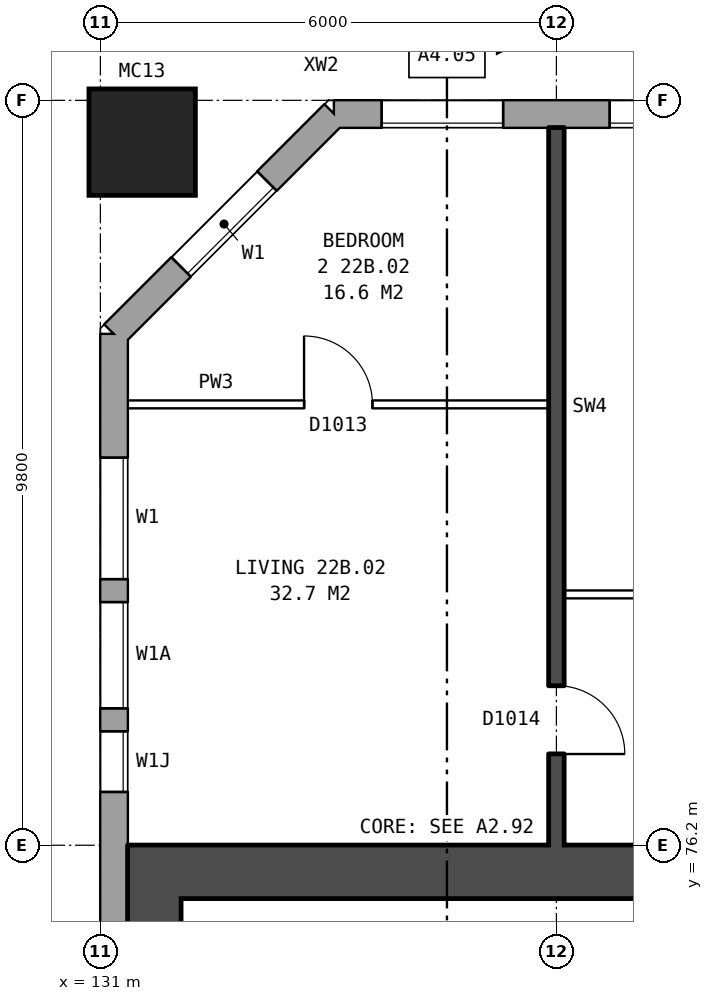
"""IFC4 building model, lengths in metres.
Left out: names, types, materials, properties, quantities, classifications, styles, units other than length and angle.
Written with IfcOpenShell. Run it as: python <this file> out.ifc"""

import sys

from ifc_helpers import new_model, si_unit, direction, frame, frame_2d, origin, origin_2d, place, context, subcontext, project, spatial, rectangle, hollow_rectangle, extrude, element, fill, save


model = new_model("IFC4")
c1 = context("Model", 3, precision=1e-05, world=origin(), true_north=direction((0.0, 1.0)))
c2 = subcontext(c1, "Body", "Model", "MODEL_VIEW")
j1 = project(units=[si_unit("LENGTHUNIT", "METRE"), si_unit("PLANEANGLEUNIT", "RADIAN")], contexts=[c1])
p1 = place(None, origin())
s1 = spatial("IfcSite", under=j1, at=p1, CompositionType="ELEMENT")
p2 = place(p1, origin())
s2 = spatial("IfcBuilding", under=s1, at=p2, CompositionType="ELEMENT")
p3 = place(p2, frame((0.0, 0.0, 80.9)))
s3 = spatial("IfcBuildingStorey", under=s2, at=p3, CompositionType="ELEMENT", Elevation=80.9)
p4 = place(p3, frame((131.55, 85.45, 0.0), z_axis=(0.0, 0.0, 1.0), x_axis=(1.0, 0.0, 0.0)))
e1 = element("IfcColumn", 1, at=p4, inside=s3, PredefinedType="COLUMN", context=c2, shape_type="SweptSolid", body=[
    extrude(hollow_rectangle(XDim=1.4, YDim=1.4, WallThickness=0.075, at=origin_2d()), origin(), (0.0, 0.0, 1.0), 3.1),
])
p5 = place(p3, frame((172.175, 85.82, 0.0), z_axis=(0.0, 0.0, 1.0), x_axis=(-1.0, 0.0, 0.0)))
e2 = element("IfcWall", 2, at=p5, inside=s3, PredefinedType="STANDARD", context=c2, shape_type="SweptSolid", body=[
    extrude(rectangle(XDim=38.101, YDim=0.36, at=frame_2d((19.05, 0.0))), origin(), (0.0, 0.0, 1.0), 2.85),
])
p6 = place(p5, frame((2.875, 0.0, 0.8)))
e3 = element("IfcOpeningElement", 3, at=p6, cuts=e2, PredefinedType="OPENING", context=c2, shape_type="SweptSolid", body=[
    extrude(rectangle(XDim=1.6, YDim=1.8, at=frame_2d((0.8, 0.9))), frame((0.0, 0.19, 0.0), z_axis=(0.0, -1.0, 0.0), x_axis=(1.0, 0.0, 0.0)), (0.0, 0.0, 1.0), 0.38),
])
p7 = place(p5, frame((5.875, 0.0, 0.8)))
e4 = element("IfcOpeningElement", 4, at=p7, cuts=e2, PredefinedType="OPENING", context=c2, shape_type="SweptSolid", body=[
    extrude(rectangle(XDim=1.6, YDim=1.8, at=frame_2d((0.8, 0.9))), frame((0.0, 0.19, 0.0), z_axis=(0.0, -1.0, 0.0), x_axis=(1.0, 0.0, 0.0)), (0.0, 0.0, 1.0), 0.38),
])
p8 = place(p5, frame((8.875, 0.0, 0.8)))
e5 = element("IfcOpeningElement", 5, at=p8, cuts=e2, PredefinedType="OPENING", context=c2, shape_type="SweptSolid", body=[
    extrude(rectangle(XDim=1.6, YDim=1.8, at=frame_2d((0.8, 0.9))), frame((0.0, 0.19, 0.0), z_axis=(0.0, -1.0, 0.0), x_axis=(1.0, 0.0, 0.0)), (0.0, 0.0, 1.0), 0.38),
])
p9 = place(p5, frame((12.575, 0.0, 0.8)))
e6 = element("IfcOpeningElement", 6, at=p9, cuts=e2, PredefinedType="OPENING", context=c2, shape_type="SweptSolid", body=[
    extrude(rectangle(XDim=0.6, YDim=0.9, at=frame_2d((0.3, 0.45))), frame((0.0, 0.19, 0.0), z_axis=(0.0, -1.0, 0.0), x_axis=(1.0, 0.0, 0.0)), (0.0, 0.0, 1.0), 0.38),
])
p10 = place(p5, frame((14.875, 0.0, 0.8)))
e7 = element("IfcOpeningElement", 7, at=p10, cuts=e2, PredefinedType="OPENING", context=c2, shape_type="SweptSolid", body=[
    extrude(rectangle(XDim=1.6, YDim=1.8, at=frame_2d((0.8, 0.9))), frame((0.0, 0.19, 0.0), z_axis=(0.0, -1.0, 0.0), x_axis=(1.0, 0.0, 0.0)), (0.0, 0.0, 1.0), 0.38),
])
p11 = place(p5, frame((17.875, 0.0, 0.8)))
e8 = element("IfcOpeningElement", 8, at=p11, cuts=e2, PredefinedType="OPENING", context=c2, shape_type="SweptSolid", body=[
    extrude(rectangle(XDim=1.6, YDim=1.8, at=frame_2d((0.8, 0.9))), frame((0.0, 0.19, 0.0), z_axis=(0.0, -1.0, 0.0), x_axis=(1.0, 0.0, 0.0)), (0.0, 0.0, 1.0), 0.38),
])
p12 = place(p5, frame((20.875, 0.0, 0.8)))
e9 = element("IfcOpeningElement", 9, at=p12, cuts=e2, PredefinedType="OPENING", context=c2, shape_type="SweptSolid", body=[
    extrude(rectangle(XDim=1.6, YDim=1.8, at=frame_2d((0.8, 0.9))), frame((0.0, 0.19, 0.0), z_axis=(0.0, -1.0, 0.0), x_axis=(1.0, 0.0, 0.0)), (0.0, 0.0, 1.0), 0.38),
])
p13 = place(p5, frame((23.375, 0.0, 0.65)))
e10 = element("IfcOpeningElement", 10, at=p13, cuts=e2, PredefinedType="OPENING", context=c2, shape_type="SweptSolid", body=[
    extrude(rectangle(XDim=1.4, YDim=1.8, at=frame_2d((0.7, 0.9))), frame((0.0, 0.19, 0.0), z_axis=(0.0, -1.0, 0.0), x_axis=(1.0, 0.0, 0.0)), (0.0, 0.0, 1.0), 0.38),
])
p14 = place(p5, frame((26.675, 0.0, 1.7)))
e11 = element("IfcOpeningElement", 11, at=p14, cuts=e2, PredefinedType="OPENING", context=c2, shape_type="SweptSolid", body=[
    extrude(rectangle(XDim=0.6, YDim=0.9, at=frame_2d((0.3, 0.45))), frame((0.0, 0.19, 0.0), z_axis=(0.0, -1.0, 0.0), x_axis=(1.0, 0.0, 0.0)), (0.0, 0.0, 1.0), 0.38),
])
p15 = place(p5, frame((29.875, 0.0, 0.8)))
e12 = element("IfcOpeningElement", 12, at=p15, cuts=e2, PredefinedType="OPENING", context=c2, shape_type="SweptSolid", body=[
    extrude(rectangle(XDim=1.6, YDim=1.8, at=frame_2d((0.8, 0.9))), frame((0.0, 0.19, 0.0), z_axis=(0.0, -1.0, 0.0), x_axis=(1.0, 0.0, 0.0)), (0.0, 0.0, 1.0), 0.38),
])
p16 = place(p5, frame((32.875, 0.0, 0.8)))
e13 = element("IfcOpeningElement", 13, at=p16, cuts=e2, PredefinedType="OPENING", context=c2, shape_type="SweptSolid", body=[
    extrude(rectangle(XDim=1.6, YDim=1.8, at=frame_2d((0.8, 0.9))), frame((0.0, 0.19, 0.0), z_axis=(0.0, -1.0, 0.0), x_axis=(1.0, 0.0, 0.0)), (0.0, 0.0, 1.0), 0.38),
])
p17 = place(p5, frame((35.875, 0.0, 0.8)))
e14 = element("IfcOpeningElement", 14, at=p17, cuts=e2, PredefinedType="OPENING", context=c2, shape_type="SweptSolid", body=[
    extrude(rectangle(XDim=1.6, YDim=1.8, at=frame_2d((0.8, 0.9))), frame((0.0, 0.19, 0.0), z_axis=(0.0, -1.0, 0.0), x_axis=(1.0, 0.0, 0.0)), (0.0, 0.0, 1.0), 0.38),
])
p18 = place(p5, frame((13.475, 0.0, 0.8)))
e15 = element("IfcOpeningElement", 15, at=p18, cuts=e2, PredefinedType="OPENING", context=c2, shape_type="SweptSolid", body=[
    extrude(rectangle(XDim=1.0, YDim=1.8, at=frame_2d((0.5, 0.9))), frame((0.0, 0.19, 0.0), z_axis=(0.0, -1.0, 0.0), x_axis=(1.0, 0.0, 0.0)), (0.0, 0.0, 1.0), 0.38),
])
p19 = place(p5, frame((25.075, 0.0, 0.55)))
e16 = element("IfcOpeningElement", 16, at=p19, cuts=e2, PredefinedType="OPENING", context=c2, shape_type="SweptSolid", body=[
    extrude(rectangle(XDim=0.6, YDim=0.9, at=frame_2d((0.3, 0.45))), frame((0.0, 0.19, 0.0), z_axis=(0.0, -1.0, 0.0), x_axis=(1.0, 0.0, 0.0)), (0.0, 0.0, 1.0), 0.38),
])
p20 = place(p5, frame((27.575, 0.0, 0.8)))
e17 = element("IfcOpeningElement", 17, at=p20, cuts=e2, PredefinedType="OPENING", context=c2, shape_type="SweptSolid", body=[
    extrude(rectangle(XDim=1.4, YDim=1.8, at=frame_2d((0.7, 0.9))), frame((0.0, 0.19, 0.0), z_axis=(0.0, -1.0, 0.0), x_axis=(1.0, 0.0, 0.0)), (0.0, 0.0, 1.0), 0.38),
])
p21 = place(p3, frame((134.075, 85.82, 0.0), z_axis=(0.0, 0.0, 1.0), x_axis=(-0.707106781187, -0.707106781187, 0.0)))
e18 = element("IfcWall", 18, at=p21, inside=s3, PredefinedType="STANDARD", context=c2, shape_type="SweptSolid", body=[
    extrude(rectangle(XDim=4.094, YDim=0.36, at=frame_2d((2.047, 0.0))), origin(), (0.0, 0.0, 1.0), 2.85),
])
p22 = place(p21, frame((1.247, 0.0, 0.8)))
e19 = element("IfcOpeningElement", 19, at=p22, cuts=e18, PredefinedType="OPENING", context=c2, shape_type="SweptSolid", body=[
    extrude(rectangle(XDim=1.6, YDim=1.8, at=frame_2d((0.8, 0.9))), frame((0.0, 0.19, 0.0), z_axis=(0.0, -1.0, 0.0), x_axis=(1.0, 0.0, 0.0)), (0.0, 0.0, 1.0), 0.38),
])
p23 = place(p3, frame((131.18, 82.925, 0.0), z_axis=(0.0, 0.0, 1.0), x_axis=(0.0, -1.0, 0.0)))
e20 = element("IfcWall", 20, at=p23, inside=s3, PredefinedType="STANDARD", context=c2, shape_type="SweptSolid", body=[
    extrude(rectangle(XDim=25.851, YDim=0.36, at=frame_2d((12.925, 0.0))), origin(), (0.0, 0.0, 1.0), 2.85),
])
p24 = place(p23, frame((1.625, 0.0, 0.8)))
e21 = element("IfcOpeningElement", 21, at=p24, cuts=e20, PredefinedType="OPENING", context=c2, shape_type="SweptSolid", body=[
    extrude(rectangle(XDim=1.6, YDim=1.8, at=frame_2d((0.8, 0.9))), frame((0.0, 0.19, 0.0), z_axis=(0.0, -1.0, 0.0), x_axis=(1.0, 0.0, 0.0)), (0.0, 0.0, 1.0), 0.38),
])
p25 = place(p23, frame((3.525, 0.0, 0.8)))
e22 = element("IfcOpeningElement", 22, at=p25, cuts=e20, PredefinedType="OPENING", context=c2, shape_type="SweptSolid", body=[
    extrude(rectangle(XDim=1.4, YDim=1.8, at=frame_2d((0.7, 0.9))), frame((0.0, 0.19, 0.0), z_axis=(0.0, -1.0, 0.0), x_axis=(1.0, 0.0, 0.0)), (0.0, 0.0, 1.0), 0.38),
])
p26 = place(p23, frame((19.225, 0.0, 0.8)))
e23 = element("IfcOpeningElement", 23, at=p26, cuts=e20, PredefinedType="OPENING", context=c2, shape_type="SweptSolid", body=[
    extrude(rectangle(XDim=1.0, YDim=1.2, at=frame_2d((0.5, 0.6))), frame((0.0, 0.19, 0.0), z_axis=(0.0, -1.0, 0.0), x_axis=(1.0, 0.0, 0.0)), (0.0, 0.0, 1.0), 0.38),
])
p27 = place(p23, frame((22.625, 0.0, 0.8)))
e24 = element("IfcOpeningElement", 24, at=p27, cuts=e20, PredefinedType="OPENING", context=c2, shape_type="SweptSolid", body=[
    extrude(rectangle(XDim=1.6, YDim=1.8, at=frame_2d((0.8, 0.9))), frame((0.0, 0.19, 0.0), z_axis=(0.0, -1.0, 0.0), x_axis=(1.0, 0.0, 0.0)), (0.0, 0.0, 1.0), 0.38),
])
p28 = place(p23, frame((5.225, 0.0, 0.8)))
e25 = element("IfcOpeningElement", 25, at=p28, cuts=e20, PredefinedType="OPENING", context=c2, shape_type="SweptSolid", body=[
    extrude(rectangle(XDim=0.8, YDim=1.5, at=frame_2d((0.4, 0.75))), frame((0.0, 0.19, 0.0), z_axis=(0.0, -1.0, 0.0), x_axis=(1.0, 0.0, 0.0)), (0.0, 0.0, 1.0), 0.38),
])
p29 = place(p23, frame((20.525, 0.0, 0.8)))
e26 = element("IfcOpeningElement", 26, at=p29, cuts=e20, PredefinedType="OPENING", context=c2, shape_type="SweptSolid", body=[
    extrude(rectangle(XDim=1.4, YDim=1.8, at=frame_2d((0.7, 0.9))), frame((0.0, 0.19, 0.0), z_axis=(0.0, -1.0, 0.0), x_axis=(1.0, 0.0, 0.0)), (0.0, 0.0, 1.0), 0.38),
])
p30 = place(p3, frame((131.71, 64.5, 0.0), z_axis=(0.0, 0.0, 1.0), x_axis=(0.0, 1.0, 0.0)))
e27 = element("IfcWall", 27, at=p30, inside=s3, PredefinedType="SHEAR", context=c2, shape_type="SweptSolid", body=[
    extrude(rectangle(XDim=11.0, YDim=0.7, at=frame_2d((5.5, 0.0))), origin(), (0.0, 0.0, 1.0), 2.85),
])
p31 = place(p3, frame((139.76, 75.85, 0.0), z_axis=(0.0, 0.0, 1.0), x_axis=(-1.0, 0.0, 0.0)))
e28 = element("IfcWall", 28, at=p31, inside=s3, PredefinedType="SHEAR", context=c2, shape_type="SweptSolid", body=[
    extrude(rectangle(XDim=8.4, YDim=0.7, at=frame_2d((4.2, 0.0))), origin(), (0.0, 0.0, 1.0), 2.85),
])
p32 = place(p3, frame((137.1, 79.5, 0.0), z_axis=(0.0, 0.0, 1.0), x_axis=(1.0, 0.0, 0.0)))
e29 = element("IfcWall", 29, at=p32, inside=s3, PredefinedType="PARTITIONING", context=c2, shape_type="SweptSolid", body=[
    extrude(rectangle(XDim=5.8, YDim=0.1, at=frame_2d((2.9, 0.0))), origin(), (0.0, 0.0, 1.0), 2.85),
])
p33 = place(p32, frame((1.3, 0.0, 0.0)))
e30 = element("IfcOpeningElement", 30, at=p33, cuts=e29, PredefinedType="OPENING", context=c2, shape_type="SweptSolid", body=[
    extrude(rectangle(XDim=0.9, YDim=2.1, at=frame_2d((0.45, 1.05))), frame((0.0, 0.06, 0.0), z_axis=(0.0, -1.0, 0.0), x_axis=(1.0, 0.0, 0.0)), (0.0, 0.0, 1.0), 0.12),
])
p34 = place(p32, frame((4.2, 0.0, 0.0)))
e31 = element("IfcOpeningElement", 31, at=p34, cuts=e29, PredefinedType="OPENING", context=c2, shape_type="SweptSolid", body=[
    extrude(rectangle(XDim=0.9, YDim=2.1, at=frame_2d((0.45, 1.05))), frame((0.0, 0.06, 0.0), z_axis=(0.0, -1.0, 0.0), x_axis=(1.0, 0.0, 0.0)), (0.0, 0.0, 1.0), 0.12),
])
p35 = place(p3, frame((131.36, 82.0, 0.0), z_axis=(0.0, 0.0, 1.0), x_axis=(1.0, 0.0, 0.0)))
e32 = element("IfcWall", 32, at=p35, inside=s3, PredefinedType="PARTITIONING", context=c2, shape_type="SweptSolid", body=[
    extrude(rectangle(XDim=5.54, YDim=0.1, at=frame_2d((2.77, 0.0))), origin(), (0.0, 0.0, 1.0), 2.85),
])
p36 = place(p35, frame((2.32, 0.0, 0.0)))
e33 = element("IfcOpeningElement", 33, at=p36, cuts=e32, PredefinedType="OPENING", context=c2, shape_type="SweptSolid", body=[
    extrude(rectangle(XDim=0.9, YDim=2.1, at=frame_2d((0.45, 1.05))), frame((0.0, 0.06, 0.0), z_axis=(0.0, -1.0, 0.0), x_axis=(1.0, 0.0, 0.0)), (0.0, 0.0, 1.0), 0.12),
])
p37 = place(p3, frame((137.0, 76.2, 0.0), z_axis=(0.0, 0.0, 1.0), x_axis=(0.0, 1.0, 0.0)))
e34 = element("IfcWall", 34, at=p37, inside=s3, PredefinedType="SOLIDWALL", context=c2, shape_type="SweptSolid", body=[
    extrude(rectangle(XDim=9.44, YDim=0.2, at=frame_2d((4.72, 0.0))), origin(), (0.0, 0.0, 1.0), 2.85),
])
p38 = place(p37, frame((1.2, 0.0, 0.0)))
e35 = element("IfcOpeningElement", 35, at=p38, cuts=e34, PredefinedType="OPENING", context=c2, shape_type="SweptSolid", body=[
    extrude(rectangle(XDim=0.9, YDim=2.1, at=frame_2d((0.45, 1.05))), frame((0.0, 0.11, 0.0), z_axis=(0.0, -1.0, 0.0), x_axis=(1.0, 0.0, 0.0)), (0.0, 0.0, 1.0), 0.22),
])
p39 = place(p16, origin())
e36 = element("IfcWindow", 36, at=p39, inside=s3, PartitioningType="SINGLE_PANEL", PredefinedType="WINDOW", context=c2, shape_type="SweptSolid", body=[
    extrude(rectangle(XDim=1.6, YDim=1.8, at=frame_2d((0.8, 0.9))), frame((0.0, 0.15, 0.0), z_axis=(0.0, -1.0, 0.0), x_axis=(1.0, 0.0, 0.0)), (0.0, 0.0, 1.0), 0.06),
])
fill(e13, e36)
p40 = place(p17, origin())
e37 = element("IfcWindow", 37, at=p40, inside=s3, PartitioningType="SINGLE_PANEL", PredefinedType="WINDOW", context=c2, shape_type="SweptSolid", body=[
    extrude(rectangle(XDim=1.6, YDim=1.8, at=frame_2d((0.8, 0.9))), frame((0.0, 0.15, 0.0), z_axis=(0.0, -1.0, 0.0), x_axis=(1.0, 0.0, 0.0)), (0.0, 0.0, 1.0), 0.06),
])
fill(e14, e37)
p41 = place(p22, origin())
e38 = element("IfcWindow", 38, at=p41, inside=s3, PartitioningType="SINGLE_PANEL", PredefinedType="WINDOW", context=c2, shape_type="SweptSolid", body=[
    extrude(rectangle(XDim=1.6, YDim=1.8, at=frame_2d((0.8, 0.9))), frame((0.0, 0.15, 0.0), z_axis=(0.0, -1.0, 0.0), x_axis=(1.0, 0.0, 0.0)), (0.0, 0.0, 1.0), 0.06),
])
fill(e19, e38)
p42 = place(p24, origin())
e39 = element("IfcWindow", 39, at=p42, inside=s3, PartitioningType="SINGLE_PANEL", PredefinedType="WINDOW", context=c2, shape_type="SweptSolid", body=[
    extrude(rectangle(XDim=1.6, YDim=1.8, at=frame_2d((0.8, 0.9))), frame((0.0, 0.15, 0.0), z_axis=(0.0, -1.0, 0.0), x_axis=(1.0, 0.0, 0.0)), (0.0, 0.0, 1.0), 0.06),
])
fill(e21, e39)
p43 = place(p25, origin())
e40 = element("IfcWindow", 40, at=p43, inside=s3, PartitioningType="SINGLE_PANEL", PredefinedType="WINDOW", context=c2, shape_type="SweptSolid", body=[
    extrude(rectangle(XDim=1.4, YDim=1.8, at=frame_2d((0.7, 0.9))), frame((0.0, 0.15, 0.0), z_axis=(0.0, -1.0, 0.0), x_axis=(1.0, 0.0, 0.0)), (0.0, 0.0, 1.0), 0.06),
])
fill(e22, e40)
p44 = place(p36, origin())
e41 = element("IfcDoor", 41, at=p44, inside=s3, OperationType="SINGLE_SWING_LEFT", PredefinedType="DOOR", context=c2, shape_type="SweptSolid", body=[
    extrude(rectangle(XDim=0.9, YDim=2.1, at=frame_2d((0.45, 1.05))), frame((0.0, 0.025, 0.0), z_axis=(0.0, -1.0, 0.0), x_axis=(1.0, 0.0, 0.0)), (0.0, 0.0, 1.0), 0.05),
])
fill(e33, e41)
p45 = place(p38, frame((0.9, 0.0, 0.0), z_axis=(0.0, 0.0, 1.0), x_axis=(-1.0, 0.0, 0.0)))
e42 = element("IfcDoor", 42, at=p45, inside=s3, OperationType="SINGLE_SWING_RIGHT", PredefinedType="DOOR", context=c2, shape_type="SweptSolid", body=[
    extrude(rectangle(XDim=0.9, YDim=2.1, at=frame_2d((0.45, 1.05))), frame((0.0, 0.025, 0.0), z_axis=(0.0, -1.0, 0.0), x_axis=(1.0, 0.0, 0.0)), (0.0, 0.0, 1.0), 0.05),
])
fill(e35, e42)
p46 = place(p28, origin())
e43 = element("IfcWindow", 43, at=p46, inside=s3, PartitioningType="SINGLE_PANEL", PredefinedType="WINDOW", context=c2, shape_type="SweptSolid", body=[
    extrude(rectangle(XDim=0.8, YDim=1.5, at=frame_2d((0.4, 0.75))), frame((0.0, 0.15, 0.0), z_axis=(0.0, -1.0, 0.0), x_axis=(1.0, 0.0, 0.0)), (0.0, 0.0, 1.0), 0.06),
])
fill(e25, e43)
save(model, sys.argv[1])
